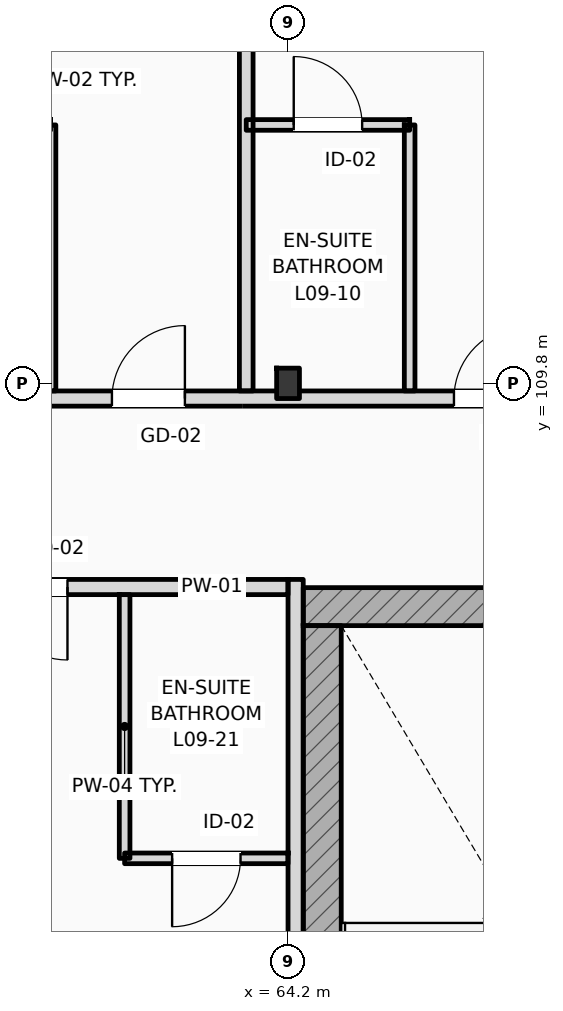
"""IFC4 building model, lengths in metres.
Left out: names, types, materials, properties, quantities, classifications, styles, units other than length and angle.
Written with IfcOpenShell. Run it as: python <this file> out.ifc"""

import sys

from ifc_helpers import new_model, si_unit, direction, frame, frame_2d, origin, origin_2d, place, context, subcontext, project, spatial, rectangle, i_section, extrude, element, fill, save


model = new_model("IFC4")
c1 = context("Model", 3, precision=1e-05, world=origin(), true_north=direction((0.0, 1.0)))
c2 = subcontext(c1, "Body", "Model", "MODEL_VIEW")
j1 = project(units=[si_unit("LENGTHUNIT", "METRE"), si_unit("PLANEANGLEUNIT", "RADIAN")], contexts=[c1])
p1 = place(None, origin())
s1 = spatial("IfcSite", under=j1, at=p1, CompositionType="ELEMENT")
p2 = place(p1, origin())
s2 = spatial("IfcBuilding", under=s1, at=p2, CompositionType="ELEMENT")
p3 = place(p2, frame((0.0, 0.0, 39.0)))
s3 = spatial("IfcBuildingStorey", under=s2, at=p3, CompositionType="ELEMENT", Elevation=39.0)
p4 = place(p3, frame((64.2, 109.8, 0.0), z_axis=(0.0, 0.0, 1.0), x_axis=(1.0, 0.0, 0.0)))
e1 = element("IfcColumn", 1, at=p4, inside=s3, PredefinedType="COLUMN", context=c2, shape_type="SweptSolid", body=[
    extrude(i_section(OverallWidth=0.3, OverallDepth=0.4, WebThickness=0.013, FlangeThickness=0.024, FilletRadius=0.027, at=origin_2d()), origin(), (0.0, 0.0, 1.0), 3.6),
])
p5 = place(p3, frame((64.4, 106.862, 0.0), z_axis=(0.0, 0.0, 1.0), x_axis=(1.0, 0.0, 0.0)))
e2 = element("IfcWall", 2, at=p5, inside=s3, PredefinedType="SHEAR", context=c2, shape_type="SweptSolid", body=[
    extrude(rectangle(XDim=5.16, YDim=0.5, at=frame_2d((2.58, 0.0))), origin(), (0.0, 0.0, 1.0), 3.6),
])
p6 = place(p3, frame((64.65, 97.5, 0.0), z_axis=(0.0, 0.0, 1.0), x_axis=(0.0, 1.0, 0.0)))
e3 = element("IfcWall", 3, at=p6, inside=s3, PredefinedType="SHEAR", context=c2, shape_type="SweptSolid", body=[
    extrude(rectangle(XDim=9.112, YDim=0.5, at=frame_2d((4.556, 0.0))), origin(), (0.0, 0.0, 1.0), 3.6),
])
p7 = place(p3, frame((10.65, 109.6, 0.0), z_axis=(0.0, 0.0, 1.0), x_axis=(1.0, 0.0, 0.0)))
e4 = element("IfcWall", 4, at=p7, inside=s3, PredefinedType="PARTITIONING", context=c2, shape_type="SweptSolid", body=[
    extrude(rectangle(XDim=84.61, YDim=0.2, at=frame_2d((42.305, 0.0))), origin(), (0.0, 0.0, 1.0), 2.82),
])
p8 = place(p7, frame((15.49, 0.0, 0.0)))
e5 = element("IfcOpeningElement", 5, at=p8, cuts=e4, PredefinedType="OPENING", context=c2, shape_type="SweptSolid", body=[
    extrude(rectangle(XDim=1.02, YDim=2.2, at=frame_2d((0.51, 1.1))), frame((0.0, 0.11, 0.0), z_axis=(0.0, -1.0, 0.0), x_axis=(1.0, 0.0, 0.0)), (0.0, 0.0, 1.0), 0.22),
])
p9 = place(p7, frame((19.703, 0.0, 0.0)))
e6 = element("IfcOpeningElement", 6, at=p9, cuts=e4, PredefinedType="OPENING", context=c2, shape_type="SweptSolid", body=[
    extrude(rectangle(XDim=1.02, YDim=2.2, at=frame_2d((0.51, 1.1))), frame((0.0, 0.11, 0.0), z_axis=(0.0, -1.0, 0.0), x_axis=(1.0, 0.0, 0.0)), (0.0, 0.0, 1.0), 0.22),
])
p10 = place(p7, frame((24.203, 0.0, 0.0)))
e7 = element("IfcOpeningElement", 7, at=p10, cuts=e4, PredefinedType="OPENING", context=c2, shape_type="SweptSolid", body=[
    extrude(rectangle(XDim=1.02, YDim=2.2, at=frame_2d((0.51, 1.1))), frame((0.0, 0.11, 0.0), z_axis=(0.0, -1.0, 0.0), x_axis=(1.0, 0.0, 0.0)), (0.0, 0.0, 1.0), 0.22),
])
p11 = place(p7, frame((26.552, 0.0, 0.0)))
e8 = element("IfcOpeningElement", 8, at=p11, cuts=e4, PredefinedType="OPENING", context=c2, shape_type="SweptSolid", body=[
    extrude(rectangle(XDim=1.02, YDim=2.2, at=frame_2d((0.51, 1.1))), frame((0.0, 0.11, 0.0), z_axis=(0.0, -1.0, 0.0), x_axis=(1.0, 0.0, 0.0)), (0.0, 0.0, 1.0), 0.22),
])
p12 = place(p7, frame((33.233, 0.0, 0.0)))
e9 = element("IfcOpeningElement", 9, at=p12, cuts=e4, PredefinedType="OPENING", context=c2, shape_type="SweptSolid", body=[
    extrude(rectangle(XDim=0.96, YDim=2.2, at=frame_2d((0.48, 1.1))), frame((0.0, 0.11, 0.0), z_axis=(0.0, -1.0, 0.0), x_axis=(1.0, 0.0, 0.0)), (0.0, 0.0, 1.0), 0.22),
])
p13 = place(p7, frame((35.583, 0.0, 0.0)))
e10 = element("IfcOpeningElement", 10, at=p13, cuts=e4, PredefinedType="OPENING", context=c2, shape_type="SweptSolid", body=[
    extrude(rectangle(XDim=0.96, YDim=2.2, at=frame_2d((0.48, 1.1))), frame((0.0, 0.11, 0.0), z_axis=(0.0, -1.0, 0.0), x_axis=(1.0, 0.0, 0.0)), (0.0, 0.0, 1.0), 0.22),
])
p14 = place(p7, frame((42.233, 0.0, 0.0)))
e11 = element("IfcOpeningElement", 11, at=p14, cuts=e4, PredefinedType="OPENING", context=c2, shape_type="SweptSolid", body=[
    extrude(rectangle(XDim=0.96, YDim=2.2, at=frame_2d((0.48, 1.1))), frame((0.0, 0.11, 0.0), z_axis=(0.0, -1.0, 0.0), x_axis=(1.0, 0.0, 0.0)), (0.0, 0.0, 1.0), 0.22),
])
p15 = place(p7, frame((46.983, 0.0, 0.0)))
e12 = element("IfcOpeningElement", 12, at=p15, cuts=e4, PredefinedType="OPENING", context=c2, shape_type="SweptSolid", body=[
    extrude(rectangle(XDim=0.96, YDim=2.2, at=frame_2d((0.48, 1.1))), frame((0.0, 0.11, 0.0), z_axis=(0.0, -1.0, 0.0), x_axis=(1.0, 0.0, 0.0)), (0.0, 0.0, 1.0), 0.22),
])
p16 = place(p7, frame((51.233, 0.0, 0.0)))
e13 = element("IfcOpeningElement", 13, at=p16, cuts=e4, PredefinedType="OPENING", context=c2, shape_type="SweptSolid", body=[
    extrude(rectangle(XDim=0.96, YDim=2.2, at=frame_2d((0.48, 1.1))), frame((0.0, 0.11, 0.0), z_axis=(0.0, -1.0, 0.0), x_axis=(1.0, 0.0, 0.0)), (0.0, 0.0, 1.0), 0.22),
])
p17 = place(p7, frame((55.733, 0.0, 0.0)))
e14 = element("IfcOpeningElement", 14, at=p17, cuts=e4, PredefinedType="OPENING", context=c2, shape_type="SweptSolid", body=[
    extrude(rectangle(XDim=0.96, YDim=2.2, at=frame_2d((0.48, 1.1))), frame((0.0, 0.11, 0.0), z_axis=(0.0, -1.0, 0.0), x_axis=(1.0, 0.0, 0.0)), (0.0, 0.0, 1.0), 0.22),
])
p18 = place(p7, frame((58.083, 0.0, 0.0)))
e15 = element("IfcOpeningElement", 15, at=p18, cuts=e4, PredefinedType="OPENING", context=c2, shape_type="SweptSolid", body=[
    extrude(rectangle(XDim=0.96, YDim=2.2, at=frame_2d((0.48, 1.1))), frame((0.0, 0.11, 0.0), z_axis=(0.0, -1.0, 0.0), x_axis=(1.0, 0.0, 0.0)), (0.0, 0.0, 1.0), 0.22),
])
p19 = place(p7, frame((64.732, 0.0, 0.0)))
e16 = element("IfcOpeningElement", 16, at=p19, cuts=e4, PredefinedType="OPENING", context=c2, shape_type="SweptSolid", body=[
    extrude(rectangle(XDim=0.96, YDim=2.2, at=frame_2d((0.48, 1.1))), frame((0.0, 0.11, 0.0), z_axis=(0.0, -1.0, 0.0), x_axis=(1.0, 0.0, 0.0)), (0.0, 0.0, 1.0), 0.22),
])
p20 = place(p7, frame((66.832, 0.0, 0.0)))
e17 = element("IfcOpeningElement", 17, at=p20, cuts=e4, PredefinedType="OPENING", context=c2, shape_type="SweptSolid", body=[
    extrude(rectangle(XDim=0.96, YDim=2.2, at=frame_2d((0.48, 1.1))), frame((0.0, 0.11, 0.0), z_axis=(0.0, -1.0, 0.0), x_axis=(1.0, 0.0, 0.0)), (0.0, 0.0, 1.0), 0.22),
])
p21 = place(p7, frame((73.732, 0.0, 0.0)))
e18 = element("IfcOpeningElement", 18, at=p21, cuts=e4, PredefinedType="OPENING", context=c2, shape_type="SweptSolid", body=[
    extrude(rectangle(XDim=0.96, YDim=2.2, at=frame_2d((0.48, 1.1))), frame((0.0, 0.11, 0.0), z_axis=(0.0, -1.0, 0.0), x_axis=(1.0, 0.0, 0.0)), (0.0, 0.0, 1.0), 0.22),
])
p22 = place(p7, frame((78.233, 0.0, 0.0)))
e19 = element("IfcOpeningElement", 19, at=p22, cuts=e4, PredefinedType="OPENING", context=c2, shape_type="SweptSolid", body=[
    extrude(rectangle(XDim=0.96, YDim=2.2, at=frame_2d((0.48, 1.1))), frame((0.0, 0.11, 0.0), z_axis=(0.0, -1.0, 0.0), x_axis=(1.0, 0.0, 0.0)), (0.0, 0.0, 1.0), 0.22),
])
p23 = place(p7, frame((80.62, 0.0, 0.0)))
e20 = element("IfcOpeningElement", 20, at=p23, cuts=e4, PredefinedType="OPENING", context=c2, shape_type="SweptSolid", body=[
    extrude(rectangle(XDim=0.96, YDim=2.2, at=frame_2d((0.48, 1.1))), frame((0.0, 0.11, 0.0), z_axis=(0.0, -1.0, 0.0), x_axis=(1.0, 0.0, 0.0)), (0.0, 0.0, 1.0), 0.22),
])
p24 = place(p7, frame((2.716, 0.0, 0.0)))
e21 = element("IfcOpeningElement", 21, at=p24, cuts=e4, PredefinedType="OPENING", context=c2, shape_type="SweptSolid", body=[
    extrude(rectangle(XDim=1.35, YDim=2.25, at=frame_2d((0.675, 1.125))), frame((0.0, 0.11, 0.0), z_axis=(0.0, -1.0, 0.0), x_axis=(1.0, 0.0, 0.0)), (0.0, 0.0, 1.0), 0.22),
])
p25 = place(p7, frame((6.65, 0.0, 0.0)))
e22 = element("IfcOpeningElement", 22, at=p25, cuts=e4, PredefinedType="OPENING", context=c2, shape_type="SweptSolid", body=[
    extrude(rectangle(XDim=1.35, YDim=2.25, at=frame_2d((0.675, 1.125))), frame((0.0, 0.11, 0.0), z_axis=(0.0, -1.0, 0.0), x_axis=(1.0, 0.0, 0.0)), (0.0, 0.0, 1.0), 0.22),
])
p26 = place(p7, frame((10.583, 0.0, 0.0)))
e23 = element("IfcOpeningElement", 23, at=p26, cuts=e4, PredefinedType="OPENING", context=c2, shape_type="SweptSolid", body=[
    extrude(rectangle(XDim=1.35, YDim=2.25, at=frame_2d((0.675, 1.125))), frame((0.0, 0.11, 0.0), z_axis=(0.0, -1.0, 0.0), x_axis=(1.0, 0.0, 0.0)), (0.0, 0.0, 1.0), 0.22),
])
p27 = place(p3, frame((40.76, 107.12, 0.0), z_axis=(0.0, 0.0, 1.0), x_axis=(1.0, 0.0, 0.0)))
e24 = element("IfcWall", 24, at=p27, inside=s3, PredefinedType="PARTITIONING", context=c2, shape_type="SweptSolid", body=[
    extrude(rectangle(XDim=23.44, YDim=0.2, at=frame_2d((11.72, 0.0))), origin(), (0.0, 0.0, 1.0), 3.38),
])
p28 = place(p27, frame((2.855, 0.0, 0.0)))
e25 = element("IfcOpeningElement", 25, at=p28, cuts=e24, PredefinedType="OPENING", context=c2, shape_type="SweptSolid", body=[
    extrude(rectangle(XDim=0.96, YDim=2.2, at=frame_2d((0.48, 1.1))), frame((0.0, 0.11, 0.0), z_axis=(0.0, -1.0, 0.0), x_axis=(1.0, 0.0, 0.0)), (0.0, 0.0, 1.0), 0.22),
])
p29 = place(p27, frame((5.433, 0.0, 0.0)))
e26 = element("IfcOpeningElement", 26, at=p29, cuts=e24, PredefinedType="OPENING", context=c2, shape_type="SweptSolid", body=[
    extrude(rectangle(XDim=0.96, YDim=2.2, at=frame_2d((0.48, 1.1))), frame((0.0, 0.11, 0.0), z_axis=(0.0, -1.0, 0.0), x_axis=(1.0, 0.0, 0.0)), (0.0, 0.0, 1.0), 0.22),
])
p30 = place(p27, frame((12.273, 0.0, 0.0)))
e27 = element("IfcOpeningElement", 27, at=p30, cuts=e24, PredefinedType="OPENING", context=c2, shape_type="SweptSolid", body=[
    extrude(rectangle(XDim=0.96, YDim=2.2, at=frame_2d((0.48, 1.1))), frame((0.0, 0.11, 0.0), z_axis=(0.0, -1.0, 0.0), x_axis=(1.0, 0.0, 0.0)), (0.0, 0.0, 1.0), 0.22),
])
p31 = place(p27, frame((16.963, 0.0, 0.0)))
e28 = element("IfcOpeningElement", 28, at=p31, cuts=e24, PredefinedType="OPENING", context=c2, shape_type="SweptSolid", body=[
    extrude(rectangle(XDim=0.96, YDim=2.2, at=frame_2d((0.48, 1.1))), frame((0.0, 0.11, 0.0), z_axis=(0.0, -1.0, 0.0), x_axis=(1.0, 0.0, 0.0)), (0.0, 0.0, 1.0), 0.22),
])
p32 = place(p27, frame((19.578, 0.0, 0.0)))
e29 = element("IfcOpeningElement", 29, at=p32, cuts=e24, PredefinedType="OPENING", context=c2, shape_type="SweptSolid", body=[
    extrude(rectangle(XDim=0.96, YDim=2.2, at=frame_2d((0.48, 1.1))), frame((0.0, 0.11, 0.0), z_axis=(0.0, -1.0, 0.0), x_axis=(1.0, 0.0, 0.0)), (0.0, 0.0, 1.0), 0.22),
])
p33 = place(p3, frame((64.3, 96.14, 0.0), z_axis=(0.0, 0.0, 1.0), x_axis=(0.0, 1.0, 0.0)))
e30 = element("IfcWall", 30, at=p33, inside=s3, PredefinedType="PARTITIONING", context=c2, shape_type="SweptSolid", body=[
    extrude(rectangle(XDim=11.08, YDim=0.2, at=frame_2d((5.54, 0.0))), origin(), (0.0, 0.0, 1.0), 3.01),
])
p34 = place(p3, frame((63.65, 109.7, 0.0), z_axis=(0.0, 0.0, 1.0), x_axis=(0.0, 1.0, 0.0)))
e31 = element("IfcWall", 31, at=p34, inside=s3, PredefinedType="PARTITIONING", context=c2, shape_type="SweptSolid", body=[
    extrude(rectangle(XDim=8.15, YDim=0.18, at=frame_2d((4.075, 0.0))), origin(), (0.0, 0.0, 1.0), 3.38),
])
for number, where, z_axis, x_axis in (
    (32, (61.075, 109.7, 0.0), (0.0, 0.0, 1.0), (0.0, 1.0, 0.0)),
    (33, (65.8, 109.7, 0.0), (0.0, 0.0, 1.0), (0.0, 1.0, 0.0)),
):
    element("IfcWall", number, at=place(p3, frame(where, z_axis=z_axis, x_axis=x_axis)), inside=s3, PredefinedType="PARTITIONING", context=c2, shape_type="SweptSolid", body=[
        extrude(rectangle(XDim=3.5, YDim=0.14, at=frame_2d((1.75, 0.0))), origin(), (0.0, 0.0, 1.0), 3.38),
    ])
p35 = place(p3, frame((63.65, 113.2, 0.0), z_axis=(0.0, 0.0, 1.0), x_axis=(1.0, 0.0, 0.0)))
e34 = element("IfcWall", 34, at=p35, inside=s3, PredefinedType="PARTITIONING", context=c2, shape_type="SweptSolid", body=[
    extrude(rectangle(XDim=2.15, YDim=0.14, at=frame_2d((1.075, 0.0))), origin(), (0.0, 0.0, 1.0), 3.38),
])
p36 = place(p35, frame((0.625, 0.0, 0.0)))
e35 = element("IfcOpeningElement", 35, at=p36, cuts=e34, PredefinedType="OPENING", context=c2, shape_type="SweptSolid", body=[
    extrude(rectangle(XDim=0.9, YDim=2.1, at=frame_2d((0.45, 1.05))), frame((0.0, 0.08, 0.0), z_axis=(0.0, -1.0, 0.0), x_axis=(1.0, 0.0, 0.0)), (0.0, 0.0, 1.0), 0.16),
])
p37 = place(p3, frame((62.05, 103.55, 0.0), z_axis=(0.0, 0.0, 1.0), x_axis=(0.0, 1.0, 0.0)))
e36 = element("IfcWall", 36, at=p37, inside=s3, PredefinedType="PARTITIONING", context=c2, shape_type="SweptSolid", body=[
    extrude(rectangle(XDim=3.47, YDim=0.14, at=frame_2d((1.735, 0.0))), origin(), (0.0, 0.0, 1.0), 3.38),
])
p38 = place(p3, frame((62.05, 103.55, 0.0), z_axis=(0.0, 0.0, 1.0), x_axis=(1.0, 0.0, 0.0)))
e37 = element("IfcWall", 37, at=p38, inside=s3, PredefinedType="PARTITIONING", context=c2, shape_type="SweptSolid", body=[
    extrude(rectangle(XDim=2.15, YDim=0.14, at=frame_2d((1.075, 0.0))), origin(), (0.0, 0.0, 1.0), 3.38),
])
p39 = place(p38, frame((0.625, 0.0, 0.0)))
e38 = element("IfcOpeningElement", 38, at=p39, cuts=e37, PredefinedType="OPENING", context=c2, shape_type="SweptSolid", body=[
    extrude(rectangle(XDim=0.9, YDim=2.1, at=frame_2d((0.45, 1.05))), frame((0.0, 0.08, 0.0), z_axis=(0.0, -1.0, 0.0), x_axis=(1.0, 0.0, 0.0)), (0.0, 0.0, 1.0), 0.16),
])
p40 = place(p16, origin())
e39 = element("IfcDoor", 39, at=p40, inside=s3, OperationType="SINGLE_SWING_RIGHT", PredefinedType="DOOR", context=c2, shape_type="SweptSolid", body=[
    extrude(rectangle(XDim=0.96, YDim=2.2, at=frame_2d((0.48, 1.1))), frame((0.0, 0.025, 0.0), z_axis=(0.0, -1.0, 0.0), x_axis=(1.0, 0.0, 0.0)), (0.0, 0.0, 1.0), 0.05),
])
fill(e13, e39)
p41 = place(p17, origin())
e40 = element("IfcDoor", 40, at=p41, inside=s3, OperationType="SINGLE_SWING_RIGHT", PredefinedType="DOOR", context=c2, shape_type="SweptSolid", body=[
    extrude(rectangle(XDim=0.96, YDim=2.2, at=frame_2d((0.48, 1.1))), frame((0.0, 0.025, 0.0), z_axis=(0.0, -1.0, 0.0), x_axis=(1.0, 0.0, 0.0)), (0.0, 0.0, 1.0), 0.05),
])
fill(e14, e40)
p42 = place(p36, origin())
e41 = element("IfcDoor", 41, at=p42, inside=s3, OperationType="SINGLE_SWING_LEFT", PredefinedType="DOOR", context=c2, shape_type="SweptSolid", body=[
    extrude(rectangle(XDim=0.9, YDim=2.1, at=frame_2d((0.45, 1.05))), frame((0.0, 0.025, 0.0), z_axis=(0.0, -1.0, 0.0), x_axis=(1.0, 0.0, 0.0)), (0.0, 0.0, 1.0), 0.05),
])
fill(e35, e41)
p43 = place(p32, frame((0.96, 0.0, 0.0), z_axis=(0.0, 0.0, 1.0), x_axis=(-1.0, 0.0, 0.0)))
e42 = element("IfcDoor", 42, at=p43, inside=s3, OperationType="SINGLE_SWING_RIGHT", PredefinedType="DOOR", context=c2, shape_type="SweptSolid", body=[
    extrude(rectangle(XDim=0.96, YDim=2.2, at=frame_2d((0.48, 1.1))), frame((0.0, 0.025, 0.0), z_axis=(0.0, -1.0, 0.0), x_axis=(1.0, 0.0, 0.0)), (0.0, 0.0, 1.0), 0.05),
])
fill(e29, e42)
p44 = place(p39, frame((0.9, 0.0, 0.0), z_axis=(0.0, 0.0, 1.0), x_axis=(-1.0, 0.0, 0.0)))
e43 = element("IfcDoor", 43, at=p44, inside=s3, OperationType="SINGLE_SWING_LEFT", PredefinedType="DOOR", context=c2, shape_type="SweptSolid", body=[
    extrude(rectangle(XDim=0.9, YDim=2.1, at=frame_2d((0.45, 1.05))), frame((0.0, 0.025, 0.0), z_axis=(0.0, -1.0, 0.0), x_axis=(1.0, 0.0, 0.0)), (0.0, 0.0, 1.0), 0.05),
])
fill(e38, e43)
save(model, sys.argv[1])
